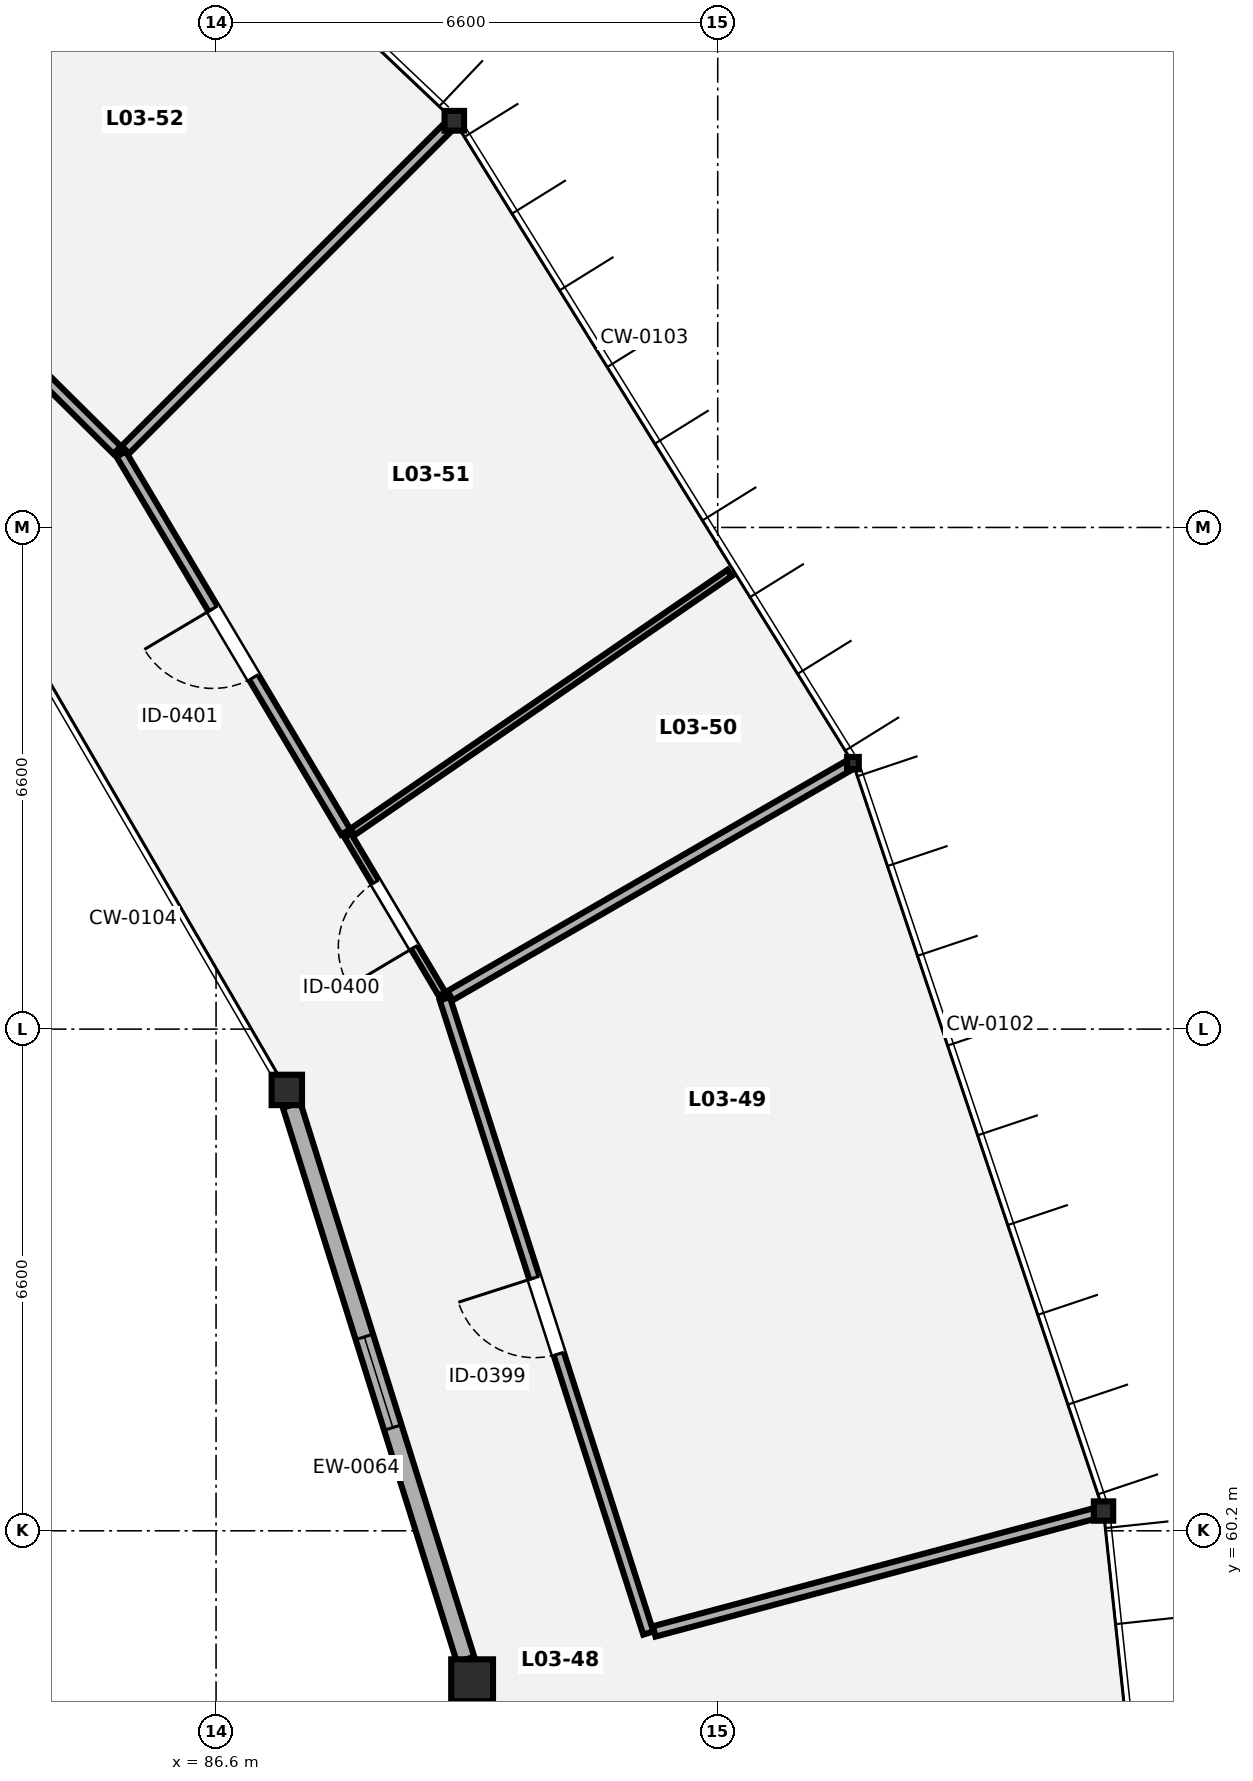
"""IFC4 building model, lengths in metres.
Left out: names, types, materials, properties, quantities, classifications, styles, units other than length and angle.
Written with IfcOpenShell. Run it as: python <this file> out.ifc"""

import sys

from ifc_helpers import new_model, si_unit, direction, frame, frame_2d, origin, origin_2d, place, context, subcontext, project, spatial, rectangle, i_section, extrude, element, fill, save


model = new_model("IFC4")
c1 = context("Model", 3, precision=1e-05, world=origin(), true_north=direction((0.0, 1.0)))
c2 = subcontext(c1, "Body", "Model", "MODEL_VIEW")
j1 = project(units=[si_unit("LENGTHUNIT", "METRE"), si_unit("PLANEANGLEUNIT", "RADIAN")], contexts=[c1])
p1 = place(None, origin())
s1 = spatial("IfcSite", under=j1, at=p1, CompositionType="ELEMENT")
p2 = place(p1, origin())
s2 = spatial("IfcBuilding", under=s1, at=p2, CompositionType="ELEMENT")
p3 = place(p2, frame((0.0, 0.0, 13.3)))
s3 = spatial("IfcBuildingStorey", under=s2, at=p3, CompositionType="ELEMENT", Elevation=13.3)
p4 = place(p3, frame((98.276, 60.46, 0.0), z_axis=(0.0, 0.0, 1.0), x_axis=(1.0, 0.0, 0.0)))
e1 = element("IfcColumn", 1, at=p4, inside=s3, PredefinedType="COLUMN", context=c2, shape_type="SweptSolid", body=[
    extrude(i_section(OverallWidth=0.254, OverallDepth=0.254, WebThickness=0.009, FlangeThickness=0.014, FilletRadius=0.014, at=origin_2d()), origin(), (0.0, 0.0, 1.0), 4.2),
])
p5 = place(p3, frame((89.969, 58.234, 0.0), z_axis=(0.0, 0.0, 1.0), x_axis=(1.0, 0.0, 0.0)))
e2 = element("IfcColumn", 2, at=p5, inside=s3, PredefinedType="COLUMN", context=c2, shape_type="SweptSolid", body=[
    extrude(rectangle(XDim=0.55, YDim=0.55, at=origin_2d()), origin(), (0.0, 0.0, 1.0), 4.2),
])
p6 = place(p3, frame((94.979, 70.3, 0.0), z_axis=(0.0, 0.0, 1.0), x_axis=(1.0, 0.0, 0.0)))
e3 = element("IfcColumn", 3, at=p6, inside=s3, PredefinedType="COLUMN", context=c2, shape_type="SweptSolid", body=[
    extrude(i_section(OverallWidth=0.154, OverallDepth=0.162, WebThickness=0.008, FlangeThickness=0.011, FilletRadius=0.009, at=origin_2d()), origin(), (0.0, 0.0, 1.0), 4.2),
])
p7 = place(p3, frame((87.531, 66.0, 0.0), z_axis=(0.0, 0.0, 1.0), x_axis=(1.0, 0.0, 0.0)))
e4 = element("IfcColumn", 4, at=p7, inside=s3, PredefinedType="PILASTER", context=c2, shape_type="SweptSolid", body=[
    extrude(rectangle(XDim=0.4, YDim=0.4, at=origin_2d()), origin(), (0.0, 0.0, 1.0), 4.2),
])
p8 = place(p3, frame((89.735, 78.75, 0.0), z_axis=(0.0, 0.0, 1.0), x_axis=(1.0, 0.0, 0.0)))
e5 = element("IfcColumn", 5, at=p8, inside=s3, PredefinedType="COLUMN", context=c2, shape_type="SweptSolid", body=[
    extrude(i_section(OverallWidth=0.256, OverallDepth=0.26, WebThickness=0.01, FlangeThickness=0.017, FilletRadius=0.014, at=origin_2d()), origin(), (0.0, 0.0, 1.0), 4.2),
])
p9 = place(p3, frame((89.883, 58.507, 0.0), z_axis=(0.0, 0.0, 1.0), x_axis=(-0.299452933333, 0.954111073575, 0.0)))
e6 = element("IfcWall", 6, at=p9, inside=s3, PredefinedType="SOLIDWALL", context=c2, shape_type="SweptSolid", body=[
    extrude(rectangle(XDim=7.646, YDim=0.24, at=frame_2d((3.823, 0.0))), origin(), (0.0, 0.0, 1.0), 3.65),
])
p10 = place(p9, frame((3.198, 0.0, 0.85)))
e7 = element("IfcOpeningElement", 7, at=p10, cuts=e6, PredefinedType="OPENING", context=c2, shape_type="SweptSolid", body=[
    extrude(rectangle(XDim=1.25, YDim=1.4, at=frame_2d((0.625, 0.7))), frame((0.0, 0.13, 0.0), z_axis=(0.0, -1.0, 0.0), x_axis=(1.0, 0.0, 0.0)), (0.0, 0.0, 1.0), 0.26),
])
p11 = place(p3, frame((92.287, 58.855, 0.0), z_axis=(0.0, 0.0, 1.0), x_axis=(-0.30548522006, 0.952196818061, 0.0)))
e8 = element("IfcWall", 8, at=p11, inside=s3, PredefinedType="PARTITIONING", context=c2, shape_type="SweptSolid", body=[
    extrude(rectangle(XDim=8.764, YDim=0.14, at=frame_2d((4.382, 0.0))), origin(), (0.0, 0.0, 1.0), 3.98),
])
p12 = place(p11, frame((3.857, 0.0, 0.0)))
e9 = element("IfcOpeningElement", 9, at=p12, cuts=e8, PredefinedType="OPENING", context=c2, shape_type="SweptSolid", body=[
    extrude(rectangle(XDim=1.05, YDim=2.15, at=frame_2d((0.525, 1.075))), frame((0.0, 0.08, 0.0), z_axis=(0.0, -1.0, 0.0), x_axis=(1.0, 0.0, 0.0)), (0.0, 0.0, 1.0), 0.16),
])
p13 = place(p3, frame((92.364, 58.876, 0.0), z_axis=(0.0, 0.0, 1.0), x_axis=(0.96591927772, 0.258843483457, 0.0)))
e10 = element("IfcWall", 10, at=p13, inside=s3, PredefinedType="PARTITIONING", context=c2, shape_type="SweptSolid", body=[
    extrude(rectangle(XDim=6.06, YDim=0.14, at=frame_2d((3.03, 0.0))), origin(), (0.0, 0.0, 1.0), 3.323),
])
p14 = place(p3, frame((89.679, 67.24, 0.0), z_axis=(0.0, 0.0, 1.0), x_axis=(0.866020543329, 0.500008418462, 0.0)))
e11 = element("IfcWall", 11, at=p14, inside=s3, PredefinedType="PARTITIONING", context=c2, shape_type="SweptSolid", body=[
    extrude(rectangle(XDim=6.06, YDim=0.14, at=frame_2d((3.03, 0.0))), origin(), (0.0, 0.0, 1.0), 3.471),
])
p15 = place(p3, frame((89.573, 67.262, 0.0), z_axis=(0.0, 0.0, 1.0), x_axis=(-0.510928867953, 0.859622994046, 0.0)))
e12 = element("IfcWall", 12, at=p15, inside=s3, PredefinedType="PARTITIONING", context=c2, shape_type="SweptSolid", body=[
    extrude(rectangle(XDim=2.429, YDim=0.1, at=frame_2d((1.214, 0.0))), origin(), (0.0, 0.0, 1.0), 3.98),
])
p16 = place(p15, frame((0.714, 0.0, 0.0)))
e13 = element("IfcOpeningElement", 13, at=p16, cuts=e12, PredefinedType="OPENING", context=c2, shape_type="SweptSolid", body=[
    extrude(rectangle(XDim=1.0, YDim=2.1, at=frame_2d((0.5, 1.05))), frame((0.0, 0.06, 0.0), z_axis=(0.0, -1.0, 0.0), x_axis=(1.0, 0.0, 0.0)), (0.0, 0.0, 1.0), 0.12),
])
p17 = place(p3, frame((88.398, 69.395, 0.0), z_axis=(0.0, 0.0, 1.0), x_axis=(0.824271584206, 0.566194626847, 0.0)))
e14 = element("IfcWall", 14, at=p17, inside=s3, PredefinedType="PARTITIONING", context=c2, shape_type="SweptSolid", body=[
    extrude(rectangle(XDim=6.016, YDim=0.1, at=frame_2d((3.008, 0.0))), origin(), (0.0, 0.0, 1.0), 3.98),
])
p18 = place(p3, frame((88.305, 69.395, 0.0), z_axis=(0.0, 0.0, 1.0), x_axis=(-0.510896676259, 0.859642126811, 0.0)))
e15 = element("IfcWall", 15, at=p18, inside=s3, PredefinedType="PARTITIONING", context=c2, shape_type="SweptSolid", body=[
    extrude(rectangle(XDim=5.783, YDim=0.14, at=frame_2d((2.892, 0.0))), origin(), (0.0, 0.0, 1.0), 3.98),
])
p19 = place(p18, frame((2.366, 0.0, 0.0)))
e16 = element("IfcOpeningElement", 16, at=p19, cuts=e15, PredefinedType="OPENING", context=c2, shape_type="SweptSolid", body=[
    extrude(rectangle(XDim=1.05, YDim=2.15, at=frame_2d((0.525, 1.075))), frame((0.0, 0.08, 0.0), z_axis=(0.0, -1.0, 0.0), x_axis=(1.0, 0.0, 0.0)), (0.0, 0.0, 1.0), 0.16),
])
p20 = place(p3, frame((85.407, 74.423, 0.0), z_axis=(0.0, 0.0, 1.0), x_axis=(0.70712692467, 0.707086637129, 0.0)))
e17 = element("IfcWall", 17, at=p20, inside=s3, PredefinedType="PARTITIONING", context=c2, shape_type="SweptSolid", body=[
    extrude(rectangle(XDim=6.06, YDim=0.14, at=frame_2d((3.03, 0.0))), origin(), (0.0, 0.0, 1.0), 3.465),
])
p21 = place(p3, frame((85.299, 74.417, 0.0), z_axis=(0.0, 0.0, 1.0), x_axis=(-0.710410596589, 0.703787456732, 0.0)))
e18 = element("IfcWall", 18, at=p21, inside=s3, PredefinedType="PARTITIONING", context=c2, shape_type="SweptSolid", body=[
    extrude(rectangle(XDim=7.741, YDim=0.14, at=frame_2d((3.871, 0.0))), origin(), (0.0, 0.0, 1.0), 3.98),
])
p22 = place(p21, frame((3.345, 0.0, 0.0)))
e19 = element("IfcOpeningElement", 19, at=p22, cuts=e18, PredefinedType="OPENING", context=c2, shape_type="SweptSolid", body=[
    extrude(rectangle(XDim=1.05, YDim=2.15, at=frame_2d((0.525, 1.075))), frame((0.0, 0.08, 0.0), z_axis=(0.0, -1.0, 0.0), x_axis=(1.0, 0.0, 0.0)), (0.0, 0.0, 1.0), 0.16),
])
p23 = place(p10, origin())
e20 = element("IfcWindow", 20, at=p23, inside=s3, PartitioningType="SINGLE_PANEL", PredefinedType="WINDOW", context=c2, shape_type="SweptSolid", body=[
    extrude(rectangle(XDim=1.25, YDim=1.4, at=frame_2d((0.625, 0.7))), frame((0.0, 0.03, 0.0), z_axis=(0.0, -1.0, 0.0), x_axis=(1.0, 0.0, 0.0)), (0.0, 0.0, 1.0), 0.06),
])
fill(e7, e20)
p24 = place(p12, origin())
e21 = element("IfcDoor", 21, at=p24, inside=s3, OperationType="SINGLE_SWING_RIGHT", PredefinedType="DOOR", context=c2, shape_type="SweptSolid", body=[
    extrude(rectangle(XDim=1.05, YDim=2.15, at=frame_2d((0.525, 1.075))), frame((0.0, 0.025, 0.0), z_axis=(0.0, -1.0, 0.0), x_axis=(1.0, 0.0, 0.0)), (0.0, 0.0, 1.0), 0.05),
])
fill(e9, e21)
p25 = place(p16, origin())
e22 = element("IfcDoor", 22, at=p25, inside=s3, OperationType="SINGLE_SWING_LEFT", PredefinedType="DOOR", context=c2, shape_type="SweptSolid", body=[
    extrude(rectangle(XDim=1.0, YDim=2.1, at=frame_2d((0.5, 1.05))), frame((0.0, 0.025, 0.0), z_axis=(0.0, -1.0, 0.0), x_axis=(1.0, 0.0, 0.0)), (0.0, 0.0, 1.0), 0.05),
])
fill(e13, e22)
p26 = place(p19, origin())
e23 = element("IfcDoor", 23, at=p26, inside=s3, OperationType="SINGLE_SWING_RIGHT", PredefinedType="DOOR", context=c2, shape_type="SweptSolid", body=[
    extrude(rectangle(XDim=1.05, YDim=2.15, at=frame_2d((0.525, 1.075))), frame((0.0, 0.025, 0.0), z_axis=(0.0, -1.0, 0.0), x_axis=(1.0, 0.0, 0.0)), (0.0, 0.0, 1.0), 0.05),
])
fill(e16, e23)
save(model, sys.argv[1])
